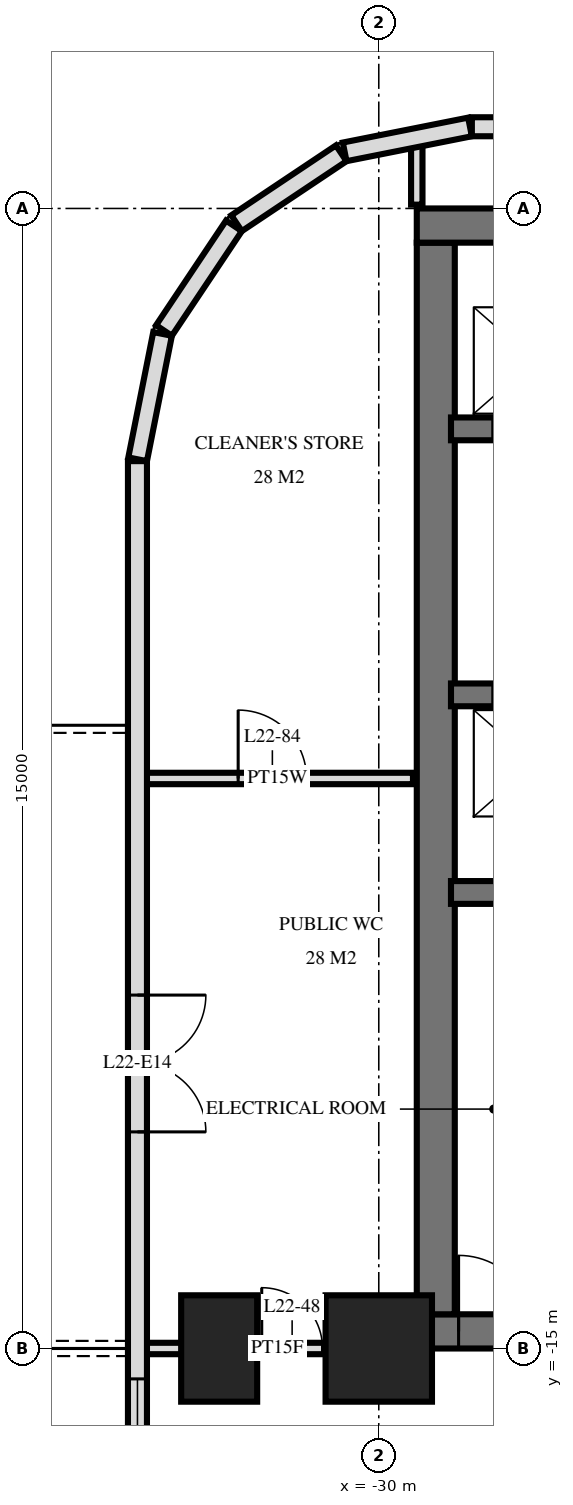
"""IFC4 building model, lengths in metres.
Left out: names, types, materials, properties, quantities, classifications, styles, units other than length and angle.
Written with IfcOpenShell. Run it as: python <this file> out.ifc"""

import sys

from ifc_helpers import new_model, si_unit, direction, frame, frame_2d, origin, origin_2d, place, context, subcontext, project, spatial, rectangle, extrude, element, fill, save


model = new_model("IFC4")
c1 = context("Model", 3, precision=1e-05, world=origin(), true_north=direction((0.0, 1.0)))
c2 = subcontext(c1, "Body", "Model", "MODEL_VIEW")
j1 = project(units=[si_unit("LENGTHUNIT", "METRE"), si_unit("PLANEANGLEUNIT", "RADIAN")], contexts=[c1])
p1 = place(None, origin())
s1 = spatial("IfcSite", under=j1, at=p1, CompositionType="ELEMENT")
p2 = place(p1, origin())
s2 = spatial("IfcBuilding", under=s1, at=p2, CompositionType="ELEMENT")
p3 = place(p2, frame((0.0, 0.0, 88.8)))
s3 = spatial("IfcBuildingStorey", under=s2, at=p3, CompositionType="ELEMENT", Elevation=88.8)
p4 = place(p3, frame((-32.1, -15.0, 0.0), z_axis=(0.0, 0.0, 1.0), x_axis=(0.0, 1.0, 0.0)))
e1 = element("IfcColumn", 1, at=p4, inside=s3, PredefinedType="COLUMN", context=c2, shape_type="SweptSolid", body=[
    extrude(rectangle(XDim=1.4, YDim=1.0, at=origin_2d()), origin(), (0.0, 0.0, 1.0), 3.6),
])
p5 = place(p3, frame((-30.0, -15.0, 0.0), z_axis=(0.0, 0.0, 1.0), x_axis=(1.0, 0.0, 0.0)))
e2 = element("IfcColumn", 2, at=p5, inside=s3, PredefinedType="COLUMN", context=c2, shape_type="SweptSolid", body=[
    extrude(rectangle(XDim=1.4, YDim=1.4, at=origin_2d()), origin(), (0.0, 0.0, 1.0), 3.6),
])
p6 = place(p3, frame((-29.5, -0.225, 0.0), z_axis=(0.0, 0.0, 1.0), x_axis=(1.0, 0.0, 0.0)))
e3 = element("IfcWall", 3, at=p6, inside=s3, PredefinedType="SHEAR", context=c2, shape_type="SweptSolid", body=[
    extrude(rectangle(XDim=19.5, YDim=0.45, at=frame_2d((9.75, 0.0))), origin(), (0.0, 0.0, 1.0), 3.6),
])
p7 = place(p3, frame((-29.5, -14.775, 0.0), z_axis=(0.0, 0.0, 1.0), x_axis=(1.0, 0.0, 0.0)))
e4 = element("IfcWall", 4, at=p7, inside=s3, PredefinedType="SHEAR", context=c2, shape_type="SweptSolid", body=[
    extrude(rectangle(XDim=19.5, YDim=0.45, at=frame_2d((9.75, 0.0))), origin(), (0.0, 0.0, 1.0), 3.6),
])
p8 = place(p7, frame((11.2, 0.0, 0.0)))
e5 = element("IfcOpeningElement", 5, at=p8, cuts=e4, PredefinedType="OPENING", context=c2, shape_type="SweptSolid", body=[
    extrude(rectangle(XDim=1.2, YDim=2.1, at=frame_2d((0.6, 1.05))), frame((0.0, 0.235, 0.0), z_axis=(0.0, -1.0, 0.0), x_axis=(1.0, 0.0, 0.0)), (0.0, 0.0, 1.0), 0.47),
])
p9 = place(p7, frame((14.25, 0.0, 0.0)))
e6 = element("IfcOpeningElement", 6, at=p9, cuts=e4, PredefinedType="OPENING", context=c2, shape_type="SweptSolid", body=[
    extrude(rectangle(XDim=1.1, YDim=2.1, at=frame_2d((0.55, 1.05))), frame((0.0, 0.235, 0.0), z_axis=(0.0, -1.0, 0.0), x_axis=(1.0, 0.0, 0.0)), (0.0, 0.0, 1.0), 0.47),
])
p10 = place(p7, frame((8.5, 0.0, 0.0)))
e7 = element("IfcOpeningElement", 7, at=p10, cuts=e4, PredefinedType="OPENING", context=c2, shape_type="SweptSolid", body=[
    extrude(rectangle(XDim=0.9, YDim=2.1, at=frame_2d((0.45, 1.05))), frame((0.0, 0.235, 0.0), z_axis=(0.0, -1.0, 0.0), x_axis=(1.0, 0.0, 0.0)), (0.0, 0.0, 1.0), 0.47),
])
p11 = place(p7, frame((6.05, 0.0, 0.0)))
e8 = element("IfcOpeningElement", 8, at=p11, cuts=e4, PredefinedType="OPENING", context=c2, shape_type="SweptSolid", body=[
    extrude(rectangle(XDim=1.0, YDim=2.1, at=frame_2d((0.5, 1.05))), frame((0.0, 0.235, 0.0), z_axis=(0.0, -1.0, 0.0), x_axis=(1.0, 0.0, 0.0)), (0.0, 0.0, 1.0), 0.47),
])
p12 = place(p7, frame((3.587, 0.0, 0.0)))
e9 = element("IfcOpeningElement", 9, at=p12, cuts=e4, PredefinedType="OPENING", context=c2, shape_type="SweptSolid", body=[
    extrude(rectangle(XDim=1.0, YDim=2.1, at=frame_2d((0.5, 1.05))), frame((0.0, 0.235, 0.0), z_axis=(0.0, -1.0, 0.0), x_axis=(1.0, 0.0, 0.0)), (0.0, 0.0, 1.0), 0.47),
])
p13 = place(p7, frame((1.85, 0.0, 0.0)))
e10 = element("IfcOpeningElement", 10, at=p13, cuts=e4, PredefinedType="OPENING", context=c2, shape_type="SweptSolid", body=[
    extrude(rectangle(XDim=1.0, YDim=2.1, at=frame_2d((0.5, 1.05))), frame((0.0, 0.235, 0.0), z_axis=(0.0, -1.0, 0.0), x_axis=(1.0, 0.0, 0.0)), (0.0, 0.0, 1.0), 0.47),
])
p14 = place(p7, frame((0.55, 0.0, 0.0)))
e11 = element("IfcOpeningElement", 11, at=p14, cuts=e4, PredefinedType="OPENING", context=c2, shape_type="SweptSolid", body=[
    extrude(rectangle(XDim=1.0, YDim=2.1, at=frame_2d((0.5, 1.05))), frame((0.0, 0.235, 0.0), z_axis=(0.0, -1.0, 0.0), x_axis=(1.0, 0.0, 0.0)), (0.0, 0.0, 1.0), 0.47),
])
p15 = place(p3, frame((-29.25, -14.55, 0.0), z_axis=(0.0, 0.0, 1.0), x_axis=(0.0, 1.0, 0.0)))
e12 = element("IfcWall", 12, at=p15, inside=s3, PredefinedType="SHEAR", context=c2, shape_type="SweptSolid", body=[
    extrude(rectangle(XDim=14.1, YDim=0.5, at=frame_2d((7.05, 0.0))), origin(), (0.0, 0.0, 1.0), 3.6),
])
p16 = place(p3, frame((-29.05, -2.9, 0.0), z_axis=(0.0, 0.0, 1.0), x_axis=(1.0, 0.0, 0.0)))
e13 = element("IfcWall", 13, at=p16, inside=s3, PredefinedType="SHEAR", context=c2, shape_type="SweptSolid", body=[
    extrude(rectangle(XDim=18.7, YDim=0.3, at=frame_2d((9.35, 0.0))), origin(), (0.0, 0.0, 1.0), 3.6),
])
p17 = place(p16, frame((2.95, 0.0, 0.0)))
e14 = element("IfcOpeningElement", 14, at=p17, cuts=e13, PredefinedType="OPENING", context=c2, shape_type="SweptSolid", body=[
    extrude(rectangle(XDim=1.1, YDim=2.1, at=frame_2d((0.55, 1.05))), frame((0.0, 0.16, 0.0), z_axis=(0.0, -1.0, 0.0), x_axis=(1.0, 0.0, 0.0)), (0.0, 0.0, 1.0), 0.32),
])
p18 = place(p16, frame((0.55, 0.0, 0.0)))
e15 = element("IfcOpeningElement", 15, at=p18, cuts=e13, PredefinedType="OPENING", context=c2, shape_type="SweptSolid", body=[
    extrude(rectangle(XDim=1.1, YDim=2.1, at=frame_2d((0.55, 1.05))), frame((0.0, 0.16, 0.0), z_axis=(0.0, -1.0, 0.0), x_axis=(1.0, 0.0, 0.0)), (0.0, 0.0, 1.0), 0.32),
])
p19 = place(p16, frame((10.9, 0.0, 0.0)))
e16 = element("IfcOpeningElement", 16, at=p19, cuts=e13, PredefinedType="OPENING", context=c2, shape_type="SweptSolid", body=[
    extrude(rectangle(XDim=0.9, YDim=2.1, at=frame_2d((0.45, 1.05))), frame((0.0, 0.16, 0.0), z_axis=(0.0, -1.0, 0.0), x_axis=(1.0, 0.0, 0.0)), (0.0, 0.0, 1.0), 0.32),
])
p20 = place(p16, frame((16.85, 0.0, 0.0)))
e17 = element("IfcOpeningElement", 17, at=p20, cuts=e13, PredefinedType="OPENING", context=c2, shape_type="SweptSolid", body=[
    extrude(rectangle(XDim=1.0, YDim=2.1, at=frame_2d((0.5, 1.05))), frame((0.0, 0.16, 0.0), z_axis=(0.0, -1.0, 0.0), x_axis=(1.0, 0.0, 0.0)), (0.0, 0.0, 1.0), 0.32),
])
p21 = place(p16, frame((14.312, 0.0, 0.0)))
e18 = element("IfcOpeningElement", 18, at=p21, cuts=e13, PredefinedType="OPENING", context=c2, shape_type="SweptSolid", body=[
    extrude(rectangle(XDim=1.0, YDim=2.1, at=frame_2d((0.5, 1.05))), frame((0.0, 0.16, 0.0), z_axis=(0.0, -1.0, 0.0), x_axis=(1.0, 0.0, 0.0)), (0.0, 0.0, 1.0), 0.32),
])
p22 = place(p16, frame((12.887, 0.0, 0.0)))
e19 = element("IfcOpeningElement", 19, at=p22, cuts=e13, PredefinedType="OPENING", context=c2, shape_type="SweptSolid", body=[
    extrude(rectangle(XDim=1.0, YDim=2.1, at=frame_2d((0.5, 1.05))), frame((0.0, 0.16, 0.0), z_axis=(0.0, -1.0, 0.0), x_axis=(1.0, 0.0, 0.0)), (0.0, 0.0, 1.0), 0.32),
])
p23 = place(p16, frame((5.6, 0.0, 0.0)))
e20 = element("IfcOpeningElement", 20, at=p23, cuts=e13, PredefinedType="OPENING", context=c2, shape_type="SweptSolid", body=[
    extrude(rectangle(XDim=1.0, YDim=2.1, at=frame_2d((0.5, 1.05))), frame((0.0, 0.16, 0.0), z_axis=(0.0, -1.0, 0.0), x_axis=(1.0, 0.0, 0.0)), (0.0, 0.0, 1.0), 0.32),
])
p24 = place(p3, frame((-29.05, -6.4, 0.0), z_axis=(0.0, 0.0, 1.0), x_axis=(1.0, 0.0, 0.0)))
e21 = element("IfcWall", 21, at=p24, inside=s3, PredefinedType="SHEAR", context=c2, shape_type="SweptSolid", body=[
    extrude(rectangle(XDim=18.7, YDim=0.3, at=frame_2d((9.35, 0.0))), origin(), (0.0, 0.0, 1.0), 3.6),
])
p25 = place(p24, frame((2.95, 0.0, 0.0)))
e22 = element("IfcOpeningElement", 22, at=p25, cuts=e21, PredefinedType="OPENING", context=c2, shape_type="SweptSolid", body=[
    extrude(rectangle(XDim=1.1, YDim=2.1, at=frame_2d((0.55, 1.05))), frame((0.0, 0.16, 0.0), z_axis=(0.0, -1.0, 0.0), x_axis=(1.0, 0.0, 0.0)), (0.0, 0.0, 1.0), 0.32),
])
p26 = place(p24, frame((0.55, 0.0, 0.0)))
e23 = element("IfcOpeningElement", 23, at=p26, cuts=e21, PredefinedType="OPENING", context=c2, shape_type="SweptSolid", body=[
    extrude(rectangle(XDim=1.1, YDim=2.1, at=frame_2d((0.55, 1.05))), frame((0.0, 0.16, 0.0), z_axis=(0.0, -1.0, 0.0), x_axis=(1.0, 0.0, 0.0)), (0.0, 0.0, 1.0), 0.32),
])
p27 = place(p24, frame((10.8, 0.0, 0.0)))
e24 = element("IfcOpeningElement", 24, at=p27, cuts=e21, PredefinedType="OPENING", context=c2, shape_type="SweptSolid", body=[
    extrude(rectangle(XDim=1.1, YDim=2.1, at=frame_2d((0.55, 1.05))), frame((0.0, 0.16, 0.0), z_axis=(0.0, -1.0, 0.0), x_axis=(1.0, 0.0, 0.0)), (0.0, 0.0, 1.0), 0.32),
])
p28 = place(p24, frame((5.6, 0.0, 0.0)))
e25 = element("IfcOpeningElement", 25, at=p28, cuts=e21, PredefinedType="OPENING", context=c2, shape_type="SweptSolid", body=[
    extrude(rectangle(XDim=1.0, YDim=2.1, at=frame_2d((0.5, 1.05))), frame((0.0, 0.16, 0.0), z_axis=(0.0, -1.0, 0.0), x_axis=(1.0, 0.0, 0.0)), (0.0, 0.0, 1.0), 0.32),
])
p29 = place(p3, frame((-29.05, -9.0, 0.0), z_axis=(0.0, 0.0, 1.0), x_axis=(1.0, 0.0, 0.0)))
e26 = element("IfcWall", 26, at=p29, inside=s3, PredefinedType="SHEAR", context=c2, shape_type="SweptSolid", body=[
    extrude(rectangle(XDim=18.7, YDim=0.3, at=frame_2d((9.35, 0.0))), origin(), (0.0, 0.0, 1.0), 3.6),
])
p30 = place(p29, frame((13.8, 0.0, 0.0)))
e27 = element("IfcOpeningElement", 27, at=p30, cuts=e26, PredefinedType="OPENING", context=c2, shape_type="SweptSolid", body=[
    extrude(rectangle(XDim=1.1, YDim=2.1, at=frame_2d((0.55, 1.05))), frame((0.0, 0.16, 0.0), z_axis=(0.0, -1.0, 0.0), x_axis=(1.0, 0.0, 0.0)), (0.0, 0.0, 1.0), 0.32),
])
p31 = place(p3, frame((28.775, 1.075, 0.0), z_axis=(0.0, 0.0, 1.0), x_axis=(-1.0, 0.0, 0.0)))
e28 = element("IfcWall", 28, at=p31, inside=s3, PredefinedType="SOLIDWALL", context=c2, shape_type="SweptSolid", body=[
    extrude(rectangle(XDim=57.551, YDim=0.25, at=frame_2d((28.775, 0.0))), origin(), (0.0, 0.0, 1.0), 3.32),
])
p32 = place(p31, frame((21.275, 0.0, 0.3)))
e29 = element("IfcOpeningElement", 29, at=p32, cuts=e28, PredefinedType="OPENING", context=c2, shape_type="SweptSolid", body=[
    extrude(rectangle(XDim=2.4, YDim=2.1, at=frame_2d((1.2, 1.05))), frame((0.0, 0.135, 0.0), z_axis=(0.0, -1.0, 0.0), x_axis=(1.0, 0.0, 0.0)), (0.0, 0.0, 1.0), 0.27),
])
p33 = place(p31, frame((24.275, 0.0, 0.3)))
e30 = element("IfcOpeningElement", 30, at=p33, cuts=e28, PredefinedType="OPENING", context=c2, shape_type="SweptSolid", body=[
    extrude(rectangle(XDim=2.4, YDim=2.1, at=frame_2d((1.2, 1.05))), frame((0.0, 0.135, 0.0), z_axis=(0.0, -1.0, 0.0), x_axis=(1.0, 0.0, 0.0)), (0.0, 0.0, 1.0), 0.27),
])
p34 = place(p31, frame((30.275, 0.0, 0.3)))
e31 = element("IfcOpeningElement", 31, at=p34, cuts=e28, PredefinedType="OPENING", context=c2, shape_type="SweptSolid", body=[
    extrude(rectangle(XDim=2.4, YDim=2.1, at=frame_2d((1.2, 1.05))), frame((0.0, 0.135, 0.0), z_axis=(0.0, -1.0, 0.0), x_axis=(1.0, 0.0, 0.0)), (0.0, 0.0, 1.0), 0.27),
])
p35 = place(p3, frame((-28.8, 1.073, 0.0), z_axis=(0.0, 0.0, 1.0), x_axis=(-0.980803419081, -0.194999110559, 0.0)))
e32 = element("IfcWall", 32, at=p35, inside=s3, PredefinedType="SOLIDWALL", context=c2, shape_type="SweptSolid", body=[
    extrude(rectangle(XDim=1.681, YDim=0.25, at=frame_2d((0.841, 0.0))), origin(), (0.0, 0.0, 1.0), 3.32),
])
for number, where, z_axis, x_axis in (
    (33, (-30.494, 0.726, 0.0), (0.0, 0.0, 1.0), (-0.831, -0.556, 0.0)),
    (34, (-31.906, -0.229, 0.0), (0.0, 0.0, 1.0), (-0.556, -0.831, 0.0)),
):
    element("IfcWall", number, at=place(p3, frame(where, z_axis=z_axis, x_axis=x_axis)), inside=s3, PredefinedType="SOLIDWALL", context=c2, shape_type="SweptSolid", body=[
        extrude(rectangle(XDim=1.656, YDim=0.25, at=frame_2d((0.828, 0.0))), origin(), (0.0, 0.0, 1.0), 3.32),
    ])
p36 = place(p3, frame((-32.844, -1.651, 0.0), z_axis=(0.0, 0.0, 1.0), x_axis=(-0.19513878023, -0.980775640221, 0.0)))
e35 = element("IfcWall", 35, at=p36, inside=s3, PredefinedType="SOLIDWALL", context=c2, shape_type="SweptSolid", body=[
    extrude(rectangle(XDim=1.681, YDim=0.25, at=frame_2d((0.841, 0.0))), origin(), (0.0, 0.0, 1.0), 3.32),
])
p37 = place(p3, frame((-33.175, -3.325, 0.0), z_axis=(0.0, 0.0, 1.0), x_axis=(0.0, -1.0, 0.0)))
e36 = element("IfcWall", 36, at=p37, inside=s3, PredefinedType="SOLIDWALL", context=c2, shape_type="SweptSolid", body=[
    extrude(rectangle(XDim=21.551, YDim=0.25, at=frame_2d((10.775, 0.0))), origin(), (0.0, 0.0, 1.0), 3.32),
])
p38 = place(p37, frame((7.025, 0.0, 0.0)))
e37 = element("IfcOpeningElement", 37, at=p38, cuts=e36, PredefinedType="OPENING", context=c2, shape_type="SweptSolid", body=[
    extrude(rectangle(XDim=1.8, YDim=2.4, at=frame_2d((0.9, 1.2))), frame((0.0, 0.135, 0.0), z_axis=(0.0, -1.0, 0.0), x_axis=(1.0, 0.0, 0.0)), (0.0, 0.0, 1.0), 0.27),
])
p39 = place(p37, frame((12.075, 0.0, 0.3)))
e38 = element("IfcOpeningElement", 38, at=p39, cuts=e36, PredefinedType="OPENING", context=c2, shape_type="SweptSolid", body=[
    extrude(rectangle(XDim=1.2, YDim=2.1, at=frame_2d((0.6, 1.05))), frame((0.0, 0.135, 0.0), z_axis=(0.0, -1.0, 0.0), x_axis=(1.0, 0.0, 0.0)), (0.0, 0.0, 1.0), 0.27),
])
p40 = place(p37, frame((14.575, 0.0, 0.0)))
e39 = element("IfcOpeningElement", 39, at=p40, cuts=e36, PredefinedType="OPENING", context=c2, shape_type="SweptSolid", body=[
    extrude(rectangle(XDim=1.8, YDim=2.4, at=frame_2d((0.9, 1.2))), frame((0.0, 0.135, 0.0), z_axis=(0.0, -1.0, 0.0), x_axis=(1.0, 0.0, 0.0)), (0.0, 0.0, 1.0), 0.27),
])
p41 = place(p37, frame((18.875, 0.0, 0.0)))
e40 = element("IfcOpeningElement", 40, at=p41, cuts=e36, PredefinedType="OPENING", context=c2, shape_type="SweptSolid", body=[
    extrude(rectangle(XDim=1.8, YDim=2.4, at=frame_2d((0.9, 1.2))), frame((0.0, 0.135, 0.0), z_axis=(0.0, -1.0, 0.0), x_axis=(1.0, 0.0, 0.0)), (0.0, 0.0, 1.0), 0.27),
])
p42 = place(p3, frame((-29.5, 0.05, 0.0), z_axis=(0.0, 0.0, 1.0), x_axis=(0.0, 1.0, 0.0)))
e41 = element("IfcWall", 41, at=p42, inside=s3, PredefinedType="PARTITIONING", context=c2, shape_type="SweptSolid", body=[
    extrude(rectangle(XDim=0.827, YDim=0.15, at=frame_2d((0.414, 0.0))), origin(), (0.0, 0.0, 1.0), 3.32),
])
p43 = place(p3, frame((-33.12, -15.0, 0.0), z_axis=(0.0, 0.0, 1.0), x_axis=(1.0, 0.0, 0.0)))
e42 = element("IfcWall", 42, at=p43, inside=s3, PredefinedType="PARTITIONING", context=c2, shape_type="SweptSolid", body=[
    extrude(rectangle(XDim=3.57, YDim=0.15, at=frame_2d((1.785, 0.0))), origin(), (0.0, 0.0, 1.0), 3.32),
])
p44 = place(p43, frame((1.58, 0.0, 0.0)))
e43 = element("IfcOpeningElement", 43, at=p44, cuts=e42, PredefinedType="OPENING", context=c2, shape_type="SweptSolid", body=[
    extrude(rectangle(XDim=0.8, YDim=2.1, at=frame_2d((0.4, 1.05))), frame((0.0, 0.085, 0.0), z_axis=(0.0, -1.0, 0.0), x_axis=(1.0, 0.0, 0.0)), (0.0, 0.0, 1.0), 0.17),
])
p45 = place(p3, frame((-33.12, -7.5, 0.0), z_axis=(0.0, 0.0, 1.0), x_axis=(1.0, 0.0, 0.0)))
e44 = element("IfcWall", 44, at=p45, inside=s3, PredefinedType="PLUMBINGWALL", context=c2, shape_type="SweptSolid", body=[
    extrude(rectangle(XDim=3.57, YDim=0.15, at=frame_2d((1.785, 0.0))), origin(), (0.0, 0.0, 1.0), 3.32),
])
p46 = place(p45, frame((1.27, 0.0, 0.0)))
e45 = element("IfcOpeningElement", 45, at=p46, cuts=e44, PredefinedType="OPENING", context=c2, shape_type="SweptSolid", body=[
    extrude(rectangle(XDim=0.9, YDim=2.1, at=frame_2d((0.45, 1.05))), frame((0.0, 0.085, 0.0), z_axis=(0.0, -1.0, 0.0), x_axis=(1.0, 0.0, 0.0)), (0.0, 0.0, 1.0), 0.17),
])
p47 = place(p38, origin())
e46 = element("IfcDoor", 46, at=p47, inside=s3, OperationType="DOUBLE_DOOR_SINGLE_SWING", PredefinedType="DOOR", context=c2, shape_type="SweptSolid", body=[
    extrude(rectangle(XDim=1.8, YDim=2.4, at=frame_2d((0.9, 1.2))), frame((0.0, 0.025, 0.0), z_axis=(0.0, -1.0, 0.0), x_axis=(1.0, 0.0, 0.0)), (0.0, 0.0, 1.0), 0.05),
])
fill(e37, e46)
p48 = place(p39, origin())
e47 = element("IfcWindow", 47, at=p48, inside=s3, PartitioningType="SINGLE_PANEL", PredefinedType="WINDOW", context=c2, shape_type="SweptSolid", body=[
    extrude(rectangle(XDim=1.2, YDim=2.1, at=frame_2d((0.6, 1.05))), frame((0.0, 0.03, 0.0), z_axis=(0.0, -1.0, 0.0), x_axis=(1.0, 0.0, 0.0)), (0.0, 0.0, 1.0), 0.06),
])
fill(e38, e47)
p49 = place(p14, origin())
e48 = element("IfcDoor", 48, at=p49, inside=s3, OperationType="SINGLE_SWING_RIGHT", PredefinedType="DOOR", context=c2, shape_type="SweptSolid", body=[
    extrude(rectangle(XDim=1.0, YDim=2.1, at=frame_2d((0.5, 1.05))), frame((0.0, 0.025, 0.0), z_axis=(0.0, -1.0, 0.0), x_axis=(1.0, 0.0, 0.0)), (0.0, 0.0, 1.0), 0.05),
])
fill(e11, e48)
p50 = place(p44, origin())
e49 = element("IfcDoor", 49, at=p50, inside=s3, OperationType="SINGLE_SWING_RIGHT", PredefinedType="DOOR", context=c2, shape_type="SweptSolid", body=[
    extrude(rectangle(XDim=0.8, YDim=2.1, at=frame_2d((0.4, 1.05))), frame((0.0, 0.025, 0.0), z_axis=(0.0, -1.0, 0.0), x_axis=(1.0, 0.0, 0.0)), (0.0, 0.0, 1.0), 0.05),
])
fill(e43, e49)
p51 = place(p46, origin())
e50 = element("IfcDoor", 50, at=p51, inside=s3, OperationType="SINGLE_SWING_RIGHT", PredefinedType="DOOR", context=c2, shape_type="SweptSolid", body=[
    extrude(rectangle(XDim=0.9, YDim=2.1, at=frame_2d((0.45, 1.05))), frame((0.0, 0.025, 0.0), z_axis=(0.0, -1.0, 0.0), x_axis=(1.0, 0.0, 0.0)), (0.0, 0.0, 1.0), 0.05),
])
fill(e45, e50)
save(model, sys.argv[1])
